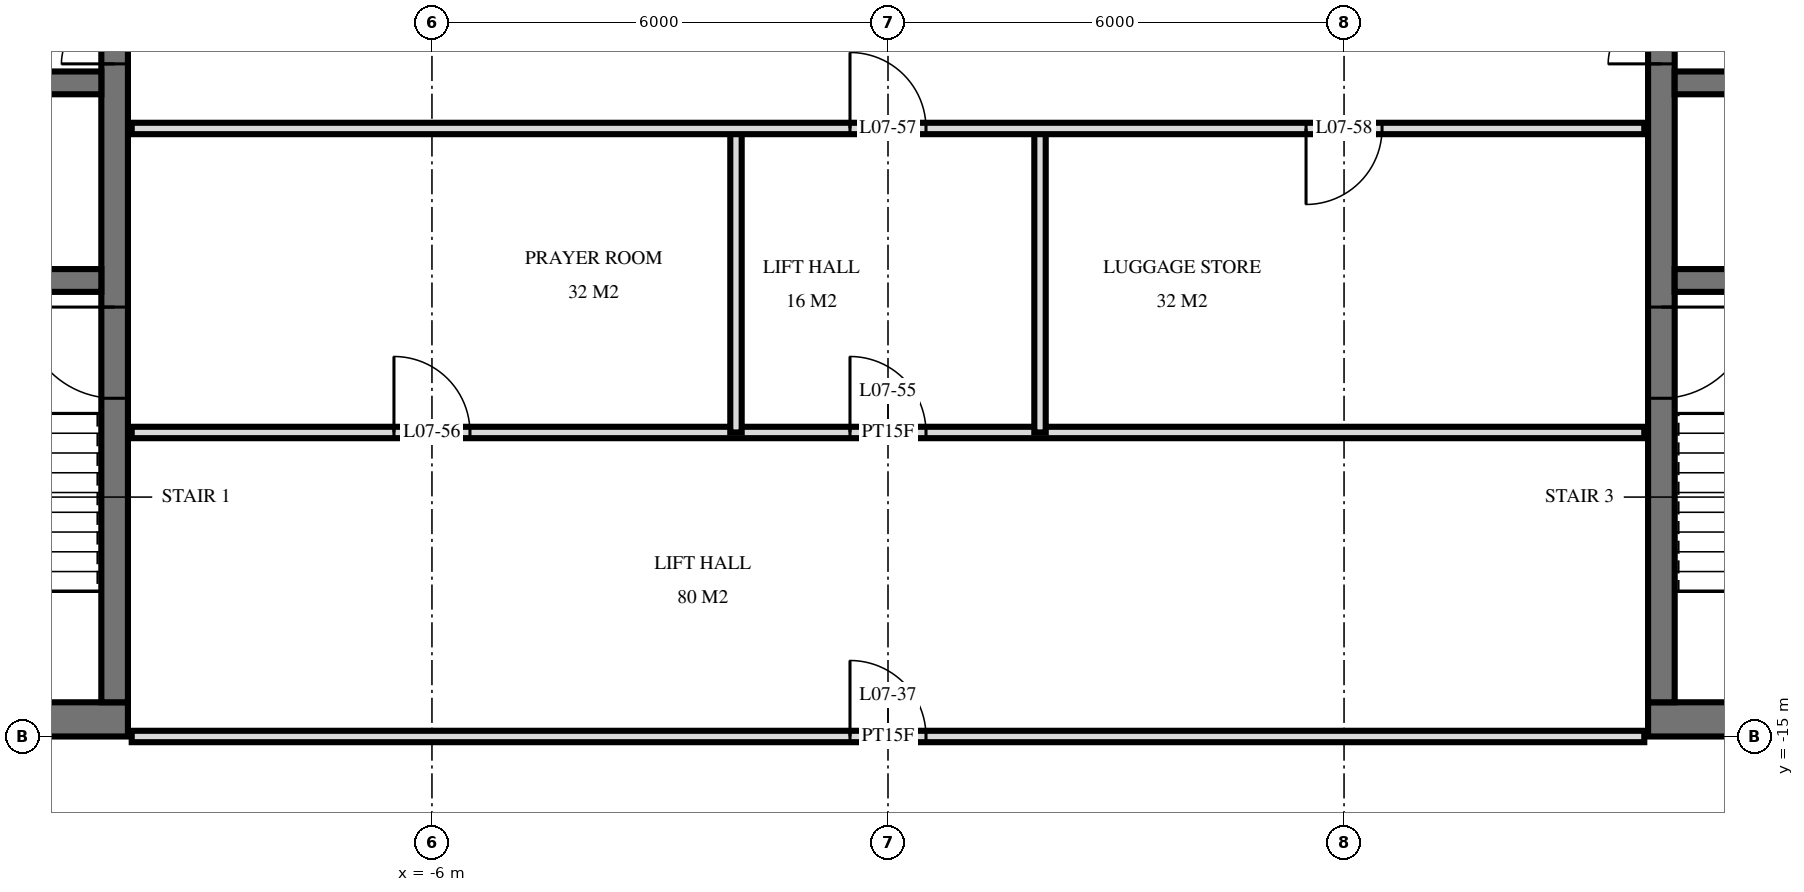
"""IFC4 building model, lengths in metres.
Left out: names, types, materials, properties, quantities, classifications, styles, units other than length and angle.
Written with IfcOpenShell. Run it as: python <this file> out.ifc"""

import sys

from ifc_helpers import new_model, si_unit, direction, frame, frame_2d, origin, place, context, subcontext, project, spatial, rectangle, extrude, element, fill, save


model = new_model("IFC4")
c1 = context("Model", 3, precision=1e-05, world=origin(), true_north=direction((0.0, 1.0)))
c2 = subcontext(c1, "Body", "Model", "MODEL_VIEW")
j1 = project(units=[si_unit("LENGTHUNIT", "METRE"), si_unit("PLANEANGLEUNIT", "RADIAN")], contexts=[c1])
p1 = place(None, origin())
s1 = spatial("IfcSite", under=j1, at=p1, CompositionType="ELEMENT")
p2 = place(p1, origin())
s2 = spatial("IfcBuilding", under=s1, at=p2, CompositionType="ELEMENT")
p3 = place(p2, frame((0.0, 0.0, 34.8)))
s3 = spatial("IfcBuildingStorey", under=s2, at=p3, CompositionType="ELEMENT", Elevation=34.8)
p4 = place(p3, frame((-29.5, -14.775, 0.0), z_axis=(0.0, 0.0, 1.0), x_axis=(1.0, 0.0, 0.0)))
e1 = element("IfcWall", 1, at=p4, inside=s3, PredefinedType="SHEAR", context=c2, shape_type="SweptSolid", body=[
    extrude(rectangle(XDim=19.5, YDim=0.45, at=frame_2d((9.75, 0.0))), origin(), (0.0, 0.0, 1.0), 3.6),
])
p5 = place(p4, frame((11.2, 0.0, 0.0)))
e2 = element("IfcOpeningElement", 2, at=p5, cuts=e1, PredefinedType="OPENING", context=c2, shape_type="SweptSolid", body=[
    extrude(rectangle(XDim=1.2, YDim=2.1, at=frame_2d((0.6, 1.05))), frame((0.0, 0.235, 0.0), z_axis=(0.0, -1.0, 0.0), x_axis=(1.0, 0.0, 0.0)), (0.0, 0.0, 1.0), 0.47),
])
p6 = place(p4, frame((14.25, 0.0, 0.0)))
e3 = element("IfcOpeningElement", 3, at=p6, cuts=e1, PredefinedType="OPENING", context=c2, shape_type="SweptSolid", body=[
    extrude(rectangle(XDim=1.1, YDim=2.1, at=frame_2d((0.55, 1.05))), frame((0.0, 0.235, 0.0), z_axis=(0.0, -1.0, 0.0), x_axis=(1.0, 0.0, 0.0)), (0.0, 0.0, 1.0), 0.47),
])
p7 = place(p4, frame((8.5, 0.0, 0.0)))
e4 = element("IfcOpeningElement", 4, at=p7, cuts=e1, PredefinedType="OPENING", context=c2, shape_type="SweptSolid", body=[
    extrude(rectangle(XDim=0.9, YDim=2.1, at=frame_2d((0.45, 1.05))), frame((0.0, 0.235, 0.0), z_axis=(0.0, -1.0, 0.0), x_axis=(1.0, 0.0, 0.0)), (0.0, 0.0, 1.0), 0.47),
])
p8 = place(p4, frame((6.05, 0.0, 0.0)))
e5 = element("IfcOpeningElement", 5, at=p8, cuts=e1, PredefinedType="OPENING", context=c2, shape_type="SweptSolid", body=[
    extrude(rectangle(XDim=1.0, YDim=2.1, at=frame_2d((0.5, 1.05))), frame((0.0, 0.235, 0.0), z_axis=(0.0, -1.0, 0.0), x_axis=(1.0, 0.0, 0.0)), (0.0, 0.0, 1.0), 0.47),
])
p9 = place(p4, frame((2.988, 0.0, 0.0)))
e6 = element("IfcOpeningElement", 6, at=p9, cuts=e1, PredefinedType="OPENING", context=c2, shape_type="SweptSolid", body=[
    extrude(rectangle(XDim=1.0, YDim=2.1, at=frame_2d((0.5, 1.05))), frame((0.0, 0.235, 0.0), z_axis=(0.0, -1.0, 0.0), x_axis=(1.0, 0.0, 0.0)), (0.0, 0.0, 1.0), 0.47),
])
p10 = place(p4, frame((0.663, 0.0, 0.0)))
e7 = element("IfcOpeningElement", 7, at=p10, cuts=e1, PredefinedType="OPENING", context=c2, shape_type="SweptSolid", body=[
    extrude(rectangle(XDim=1.0, YDim=2.1, at=frame_2d((0.5, 1.05))), frame((0.0, 0.235, 0.0), z_axis=(0.0, -1.0, 0.0), x_axis=(1.0, 0.0, 0.0)), (0.0, 0.0, 1.0), 0.47),
])
p11 = place(p3, frame((-10.175, -14.55, 0.0), z_axis=(0.0, 0.0, 1.0), x_axis=(0.0, 1.0, 0.0)))
e8 = element("IfcWall", 8, at=p11, inside=s3, PredefinedType="SHEAR", context=c2, shape_type="SweptSolid", body=[
    extrude(rectangle(XDim=14.1, YDim=0.35, at=frame_2d((7.05, 0.0))), origin(), (0.0, 0.0, 1.0), 3.6),
])
p12 = place(p11, frame((8.4, 0.0, 0.0)))
e9 = element("IfcOpeningElement", 9, at=p12, cuts=e8, PredefinedType="OPENING", context=c2, shape_type="SweptSolid", body=[
    extrude(rectangle(XDim=1.4, YDim=2.4, at=frame_2d((0.7, 1.2))), frame((0.0, 0.185, 0.0), z_axis=(0.0, -1.0, 0.0), x_axis=(1.0, 0.0, 0.0)), (0.0, 0.0, 1.0), 0.37),
])
p13 = place(p11, frame((10.0, 0.0, 0.0)))
e10 = element("IfcOpeningElement", 10, at=p13, cuts=e8, PredefinedType="OPENING", context=c2, shape_type="SweptSolid", body=[
    extrude(rectangle(XDim=1.4, YDim=2.4, at=frame_2d((0.7, 1.2))), frame((0.0, 0.185, 0.0), z_axis=(0.0, -1.0, 0.0), x_axis=(1.0, 0.0, 0.0)), (0.0, 0.0, 1.0), 0.37),
])
p14 = place(p11, frame((4.0, 0.0, 0.0)))
e11 = element("IfcOpeningElement", 11, at=p14, cuts=e8, PredefinedType="OPENING", context=c2, shape_type="SweptSolid", body=[
    extrude(rectangle(XDim=1.2, YDim=2.1, at=frame_2d((0.6, 1.05))), frame((0.0, 0.185, 0.0), z_axis=(0.0, -1.0, 0.0), x_axis=(1.0, 0.0, 0.0)), (0.0, 0.0, 1.0), 0.37),
])
p15 = place(p3, frame((-29.05, -6.4, 0.0), z_axis=(0.0, 0.0, 1.0), x_axis=(1.0, 0.0, 0.0)))
e12 = element("IfcWall", 12, at=p15, inside=s3, PredefinedType="SHEAR", context=c2, shape_type="SweptSolid", body=[
    extrude(rectangle(XDim=18.7, YDim=0.3, at=frame_2d((9.35, 0.0))), origin(), (0.0, 0.0, 1.0), 3.6),
])
p16 = place(p15, frame((2.95, 0.0, 0.0)))
e13 = element("IfcOpeningElement", 13, at=p16, cuts=e12, PredefinedType="OPENING", context=c2, shape_type="SweptSolid", body=[
    extrude(rectangle(XDim=1.1, YDim=2.1, at=frame_2d((0.55, 1.05))), frame((0.0, 0.16, 0.0), z_axis=(0.0, -1.0, 0.0), x_axis=(1.0, 0.0, 0.0)), (0.0, 0.0, 1.0), 0.32),
])
p17 = place(p15, frame((0.55, 0.0, 0.0)))
e14 = element("IfcOpeningElement", 14, at=p17, cuts=e12, PredefinedType="OPENING", context=c2, shape_type="SweptSolid", body=[
    extrude(rectangle(XDim=1.1, YDim=2.1, at=frame_2d((0.55, 1.05))), frame((0.0, 0.16, 0.0), z_axis=(0.0, -1.0, 0.0), x_axis=(1.0, 0.0, 0.0)), (0.0, 0.0, 1.0), 0.32),
])
p18 = place(p15, frame((10.8, 0.0, 0.0)))
e15 = element("IfcOpeningElement", 15, at=p18, cuts=e12, PredefinedType="OPENING", context=c2, shape_type="SweptSolid", body=[
    extrude(rectangle(XDim=1.1, YDim=2.1, at=frame_2d((0.55, 1.05))), frame((0.0, 0.16, 0.0), z_axis=(0.0, -1.0, 0.0), x_axis=(1.0, 0.0, 0.0)), (0.0, 0.0, 1.0), 0.32),
])
p19 = place(p15, frame((5.6, 0.0, 0.0)))
e16 = element("IfcOpeningElement", 16, at=p19, cuts=e12, PredefinedType="OPENING", context=c2, shape_type="SweptSolid", body=[
    extrude(rectangle(XDim=1.0, YDim=2.1, at=frame_2d((0.5, 1.05))), frame((0.0, 0.16, 0.0), z_axis=(0.0, -1.0, 0.0), x_axis=(1.0, 0.0, 0.0)), (0.0, 0.0, 1.0), 0.32),
])
p20 = place(p3, frame((-29.05, -9.0, 0.0), z_axis=(0.0, 0.0, 1.0), x_axis=(1.0, 0.0, 0.0)))
e17 = element("IfcWall", 17, at=p20, inside=s3, PredefinedType="SHEAR", context=c2, shape_type="SweptSolid", body=[
    extrude(rectangle(XDim=18.7, YDim=0.3, at=frame_2d((9.35, 0.0))), origin(), (0.0, 0.0, 1.0), 3.6),
])
p21 = place(p20, frame((13.8, 0.0, 0.0)))
e18 = element("IfcOpeningElement", 18, at=p21, cuts=e17, PredefinedType="OPENING", context=c2, shape_type="SweptSolid", body=[
    extrude(rectangle(XDim=1.1, YDim=2.1, at=frame_2d((0.55, 1.05))), frame((0.0, 0.16, 0.0), z_axis=(0.0, -1.0, 0.0), x_axis=(1.0, 0.0, 0.0)), (0.0, 0.0, 1.0), 0.32),
])
p22 = place(p3, frame((10.0, -14.775, 0.0), z_axis=(0.0, 0.0, 1.0), x_axis=(1.0, 0.0, 0.0)))
e19 = element("IfcWall", 19, at=p22, inside=s3, PredefinedType="SHEAR", context=c2, shape_type="SweptSolid", body=[
    extrude(rectangle(XDim=19.5, YDim=0.45, at=frame_2d((9.75, 0.0))), origin(), (0.0, 0.0, 1.0), 3.6),
])
p23 = place(p22, frame((7.1, 0.0, 0.0)))
e20 = element("IfcOpeningElement", 20, at=p23, cuts=e19, PredefinedType="OPENING", context=c2, shape_type="SweptSolid", body=[
    extrude(rectangle(XDim=1.2, YDim=2.1, at=frame_2d((0.6, 1.05))), frame((0.0, 0.235, 0.0), z_axis=(0.0, -1.0, 0.0), x_axis=(1.0, 0.0, 0.0)), (0.0, 0.0, 1.0), 0.47),
])
p24 = place(p22, frame((4.15, 0.0, 0.0)))
e21 = element("IfcOpeningElement", 21, at=p24, cuts=e19, PredefinedType="OPENING", context=c2, shape_type="SweptSolid", body=[
    extrude(rectangle(XDim=1.1, YDim=2.1, at=frame_2d((0.55, 1.05))), frame((0.0, 0.235, 0.0), z_axis=(0.0, -1.0, 0.0), x_axis=(1.0, 0.0, 0.0)), (0.0, 0.0, 1.0), 0.47),
])
p25 = place(p22, frame((10.1, 0.0, 0.0)))
e22 = element("IfcOpeningElement", 22, at=p25, cuts=e19, PredefinedType="OPENING", context=c2, shape_type="SweptSolid", body=[
    extrude(rectangle(XDim=0.9, YDim=2.1, at=frame_2d((0.45, 1.05))), frame((0.0, 0.235, 0.0), z_axis=(0.0, -1.0, 0.0), x_axis=(1.0, 0.0, 0.0)), (0.0, 0.0, 1.0), 0.47),
])
p26 = place(p22, frame((12.45, 0.0, 0.0)))
e23 = element("IfcOpeningElement", 23, at=p26, cuts=e19, PredefinedType="OPENING", context=c2, shape_type="SweptSolid", body=[
    extrude(rectangle(XDim=1.0, YDim=2.1, at=frame_2d((0.5, 1.05))), frame((0.0, 0.235, 0.0), z_axis=(0.0, -1.0, 0.0), x_axis=(1.0, 0.0, 0.0)), (0.0, 0.0, 1.0), 0.47),
])
p27 = place(p22, frame((15.512, 0.0, 0.0)))
e24 = element("IfcOpeningElement", 24, at=p27, cuts=e19, PredefinedType="OPENING", context=c2, shape_type="SweptSolid", body=[
    extrude(rectangle(XDim=1.0, YDim=2.1, at=frame_2d((0.5, 1.05))), frame((0.0, 0.235, 0.0), z_axis=(0.0, -1.0, 0.0), x_axis=(1.0, 0.0, 0.0)), (0.0, 0.0, 1.0), 0.47),
])
p28 = place(p22, frame((17.837, 0.0, 0.0)))
e25 = element("IfcOpeningElement", 25, at=p28, cuts=e19, PredefinedType="OPENING", context=c2, shape_type="SweptSolid", body=[
    extrude(rectangle(XDim=1.0, YDim=2.1, at=frame_2d((0.5, 1.05))), frame((0.0, 0.235, 0.0), z_axis=(0.0, -1.0, 0.0), x_axis=(1.0, 0.0, 0.0)), (0.0, 0.0, 1.0), 0.47),
])
p29 = place(p3, frame((10.175, -14.55, 0.0), z_axis=(0.0, 0.0, 1.0), x_axis=(0.0, 1.0, 0.0)))
e26 = element("IfcWall", 26, at=p29, inside=s3, PredefinedType="SHEAR", context=c2, shape_type="SweptSolid", body=[
    extrude(rectangle(XDim=14.1, YDim=0.35, at=frame_2d((7.05, 0.0))), origin(), (0.0, 0.0, 1.0), 3.6),
])
p30 = place(p29, frame((8.4, 0.0, 0.0)))
e27 = element("IfcOpeningElement", 27, at=p30, cuts=e26, PredefinedType="OPENING", context=c2, shape_type="SweptSolid", body=[
    extrude(rectangle(XDim=1.4, YDim=2.4, at=frame_2d((0.7, 1.2))), frame((0.0, 0.185, 0.0), z_axis=(0.0, -1.0, 0.0), x_axis=(1.0, 0.0, 0.0)), (0.0, 0.0, 1.0), 0.37),
])
p31 = place(p29, frame((10.0, 0.0, 0.0)))
e28 = element("IfcOpeningElement", 28, at=p31, cuts=e26, PredefinedType="OPENING", context=c2, shape_type="SweptSolid", body=[
    extrude(rectangle(XDim=1.4, YDim=2.4, at=frame_2d((0.7, 1.2))), frame((0.0, 0.185, 0.0), z_axis=(0.0, -1.0, 0.0), x_axis=(1.0, 0.0, 0.0)), (0.0, 0.0, 1.0), 0.37),
])
p32 = place(p29, frame((4.0, 0.0, 0.0)))
e29 = element("IfcOpeningElement", 29, at=p32, cuts=e26, PredefinedType="OPENING", context=c2, shape_type="SweptSolid", body=[
    extrude(rectangle(XDim=1.2, YDim=2.1, at=frame_2d((0.6, 1.05))), frame((0.0, 0.185, 0.0), z_axis=(0.0, -1.0, 0.0), x_axis=(1.0, 0.0, 0.0)), (0.0, 0.0, 1.0), 0.37),
])
p33 = place(p3, frame((10.35, -6.4, 0.0), z_axis=(0.0, 0.0, 1.0), x_axis=(1.0, 0.0, 0.0)))
e30 = element("IfcWall", 30, at=p33, inside=s3, PredefinedType="SHEAR", context=c2, shape_type="SweptSolid", body=[
    extrude(rectangle(XDim=18.7, YDim=0.3, at=frame_2d((9.35, 0.0))), origin(), (0.0, 0.0, 1.0), 3.6),
])
p34 = place(p33, frame((14.65, 0.0, 0.0)))
e31 = element("IfcOpeningElement", 31, at=p34, cuts=e30, PredefinedType="OPENING", context=c2, shape_type="SweptSolid", body=[
    extrude(rectangle(XDim=1.1, YDim=2.1, at=frame_2d((0.55, 1.05))), frame((0.0, 0.16, 0.0), z_axis=(0.0, -1.0, 0.0), x_axis=(1.0, 0.0, 0.0)), (0.0, 0.0, 1.0), 0.32),
])
p35 = place(p33, frame((17.05, 0.0, 0.0)))
e32 = element("IfcOpeningElement", 32, at=p35, cuts=e30, PredefinedType="OPENING", context=c2, shape_type="SweptSolid", body=[
    extrude(rectangle(XDim=1.1, YDim=2.1, at=frame_2d((0.55, 1.05))), frame((0.0, 0.16, 0.0), z_axis=(0.0, -1.0, 0.0), x_axis=(1.0, 0.0, 0.0)), (0.0, 0.0, 1.0), 0.32),
])
p36 = place(p33, frame((6.8, 0.0, 0.0)))
e33 = element("IfcOpeningElement", 33, at=p36, cuts=e30, PredefinedType="OPENING", context=c2, shape_type="SweptSolid", body=[
    extrude(rectangle(XDim=1.1, YDim=2.1, at=frame_2d((0.55, 1.05))), frame((0.0, 0.16, 0.0), z_axis=(0.0, -1.0, 0.0), x_axis=(1.0, 0.0, 0.0)), (0.0, 0.0, 1.0), 0.32),
])
p37 = place(p33, frame((12.1, 0.0, 0.0)))
e34 = element("IfcOpeningElement", 34, at=p37, cuts=e30, PredefinedType="OPENING", context=c2, shape_type="SweptSolid", body=[
    extrude(rectangle(XDim=1.0, YDim=2.1, at=frame_2d((0.5, 1.05))), frame((0.0, 0.16, 0.0), z_axis=(0.0, -1.0, 0.0), x_axis=(1.0, 0.0, 0.0)), (0.0, 0.0, 1.0), 0.32),
])
p38 = place(p3, frame((10.35, -9.0, 0.0), z_axis=(0.0, 0.0, 1.0), x_axis=(1.0, 0.0, 0.0)))
e35 = element("IfcWall", 35, at=p38, inside=s3, PredefinedType="SHEAR", context=c2, shape_type="SweptSolid", body=[
    extrude(rectangle(XDim=18.7, YDim=0.3, at=frame_2d((9.35, 0.0))), origin(), (0.0, 0.0, 1.0), 3.6),
])
p39 = place(p38, frame((3.8, 0.0, 0.0)))
e36 = element("IfcOpeningElement", 36, at=p39, cuts=e35, PredefinedType="OPENING", context=c2, shape_type="SweptSolid", body=[
    extrude(rectangle(XDim=1.1, YDim=2.1, at=frame_2d((0.55, 1.05))), frame((0.0, 0.16, 0.0), z_axis=(0.0, -1.0, 0.0), x_axis=(1.0, 0.0, 0.0)), (0.0, 0.0, 1.0), 0.32),
])
for number, where, z_axis, x_axis in (
    (37, (2.0, -11.0, 0.0), (0.0, 0.0, 1.0), (0.0, 1.0, 0.0)),
    (38, (-2.0, -11.0, 0.0), (0.0, 0.0, 1.0), (0.0, 1.0, 0.0)),
):
    element("IfcWall", number, at=place(p3, frame(where, z_axis=z_axis, x_axis=x_axis)), inside=s3, PredefinedType="PARTITIONING", context=c2, shape_type="SweptSolid", body=[
        extrude(rectangle(XDim=4.0, YDim=0.15, at=frame_2d((2.0, 0.0))), origin(), (0.0, 0.0, 1.0), 3.32),
    ])
p40 = place(p3, frame((-9.95, -15.0, 0.0), z_axis=(0.0, 0.0, 1.0), x_axis=(1.0, 0.0, 0.0)))
e39 = element("IfcWall", 39, at=p40, inside=s3, PredefinedType="PARTITIONING", context=c2, shape_type="SweptSolid", body=[
    extrude(rectangle(XDim=19.9, YDim=0.15, at=frame_2d((9.95, 0.0))), origin(), (0.0, 0.0, 1.0), 2.684),
])
p41 = place(p40, frame((9.45, 0.0, 0.0)))
e40 = element("IfcOpeningElement", 40, at=p41, cuts=e39, PredefinedType="OPENING", context=c2, shape_type="SweptSolid", body=[
    extrude(rectangle(XDim=1.0, YDim=2.1, at=frame_2d((0.5, 1.05))), frame((0.0, 0.085, 0.0), z_axis=(0.0, -1.0, 0.0), x_axis=(1.0, 0.0, 0.0)), (0.0, 0.0, 1.0), 0.17),
])
p42 = place(p3, frame((-9.95, -11.0, 0.0), z_axis=(0.0, 0.0, 1.0), x_axis=(1.0, 0.0, 0.0)))
e41 = element("IfcWall", 41, at=p42, inside=s3, PredefinedType="PARTITIONING", context=c2, shape_type="SweptSolid", body=[
    extrude(rectangle(XDim=19.9, YDim=0.15, at=frame_2d((9.95, 0.0))), origin(), (0.0, 0.0, 1.0), 3.32),
])
p43 = place(p42, frame((9.45, 0.0, 0.0)))
e42 = element("IfcOpeningElement", 42, at=p43, cuts=e41, PredefinedType="OPENING", context=c2, shape_type="SweptSolid", body=[
    extrude(rectangle(XDim=1.0, YDim=2.1, at=frame_2d((0.5, 1.05))), frame((0.0, 0.085, 0.0), z_axis=(0.0, -1.0, 0.0), x_axis=(1.0, 0.0, 0.0)), (0.0, 0.0, 1.0), 0.17),
])
p44 = place(p42, frame((3.45, 0.0, 0.0)))
e43 = element("IfcOpeningElement", 43, at=p44, cuts=e41, PredefinedType="OPENING", context=c2, shape_type="SweptSolid", body=[
    extrude(rectangle(XDim=1.0, YDim=2.1, at=frame_2d((0.5, 1.05))), frame((0.0, 0.085, 0.0), z_axis=(0.0, -1.0, 0.0), x_axis=(1.0, 0.0, 0.0)), (0.0, 0.0, 1.0), 0.17),
])
p45 = place(p3, frame((-9.95, -7.0, 0.0), z_axis=(0.0, 0.0, 1.0), x_axis=(1.0, 0.0, 0.0)))
e44 = element("IfcWall", 44, at=p45, inside=s3, PredefinedType="PARTITIONING", context=c2, shape_type="SweptSolid", body=[
    extrude(rectangle(XDim=19.9, YDim=0.15, at=frame_2d((9.95, 0.0))), origin(), (0.0, 0.0, 1.0), 3.32),
])
p46 = place(p45, frame((9.45, 0.0, 0.0)))
e45 = element("IfcOpeningElement", 45, at=p46, cuts=e44, PredefinedType="OPENING", context=c2, shape_type="SweptSolid", body=[
    extrude(rectangle(XDim=1.0, YDim=2.1, at=frame_2d((0.5, 1.05))), frame((0.0, 0.085, 0.0), z_axis=(0.0, -1.0, 0.0), x_axis=(1.0, 0.0, 0.0)), (0.0, 0.0, 1.0), 0.17),
])
p47 = place(p45, frame((15.45, 0.0, 0.0)))
e46 = element("IfcOpeningElement", 46, at=p47, cuts=e44, PredefinedType="OPENING", context=c2, shape_type="SweptSolid", body=[
    extrude(rectangle(XDim=1.0, YDim=2.1, at=frame_2d((0.5, 1.05))), frame((0.0, 0.085, 0.0), z_axis=(0.0, -1.0, 0.0), x_axis=(1.0, 0.0, 0.0)), (0.0, 0.0, 1.0), 0.17),
])
p48 = place(p12, origin())
e47 = element("IfcDoor", 47, at=p48, inside=s3, OperationType="DOUBLE_DOOR_SINGLE_SWING", PredefinedType="DOOR", context=c2, shape_type="SweptSolid", body=[
    extrude(rectangle(XDim=1.4, YDim=2.4, at=frame_2d((0.7, 1.2))), frame((0.0, 0.025, 0.0), z_axis=(0.0, -1.0, 0.0), x_axis=(1.0, 0.0, 0.0)), (0.0, 0.0, 1.0), 0.05),
])
fill(e9, e47)
p49 = place(p14, origin())
e48 = element("IfcDoor", 48, at=p49, inside=s3, OperationType="SINGLE_SWING_LEFT", PredefinedType="DOOR", context=c2, shape_type="SweptSolid", body=[
    extrude(rectangle(XDim=1.2, YDim=2.1, at=frame_2d((0.6, 1.05))), frame((0.0, 0.025, 0.0), z_axis=(0.0, -1.0, 0.0), x_axis=(1.0, 0.0, 0.0)), (0.0, 0.0, 1.0), 0.05),
])
fill(e11, e48)
p50 = place(p30, origin())
e49 = element("IfcDoor", 49, at=p50, inside=s3, OperationType="DOUBLE_DOOR_SINGLE_SWING", PredefinedType="DOOR", context=c2, shape_type="SweptSolid", body=[
    extrude(rectangle(XDim=1.4, YDim=2.4, at=frame_2d((0.7, 1.2))), frame((0.0, 0.025, 0.0), z_axis=(0.0, -1.0, 0.0), x_axis=(1.0, 0.0, 0.0)), (0.0, 0.0, 1.0), 0.05),
])
fill(e27, e49)
p51 = place(p32, frame((0.6, 0.0, 0.0), z_axis=(0.0, 0.0, 1.0), x_axis=(-1.0, 0.0, 0.0)))
e50 = element("IfcDoor", 50, at=p51, inside=s3, OperationType="SINGLE_SWING_RIGHT", PredefinedType="DOOR", context=c2, shape_type="SweptSolid", body=[
    extrude(rectangle(XDim=1.2, YDim=2.1, at=frame_2d((0.0, 1.05))), frame((0.0, -0.025, 0.0), z_axis=(0.0, 1.0, 0.0), x_axis=(-1.0, 0.0, 0.0)), (0.0, 0.0, 1.0), 0.05),
])
fill(e29, e50)
p52 = place(p41, origin())
e51 = element("IfcDoor", 51, at=p52, inside=s3, OperationType="SINGLE_SWING_RIGHT", PredefinedType="DOOR", context=c2, shape_type="SweptSolid", body=[
    extrude(rectangle(XDim=1.0, YDim=2.1, at=frame_2d((0.5, 1.05))), frame((0.0, 0.025, 0.0), z_axis=(0.0, -1.0, 0.0), x_axis=(1.0, 0.0, 0.0)), (0.0, 0.0, 1.0), 0.05),
])
fill(e40, e51)
p53 = place(p43, origin())
e52 = element("IfcDoor", 52, at=p53, inside=s3, OperationType="SINGLE_SWING_RIGHT", PredefinedType="DOOR", context=c2, shape_type="SweptSolid", body=[
    extrude(rectangle(XDim=1.0, YDim=2.1, at=frame_2d((0.5, 1.05))), frame((0.0, 0.025, 0.0), z_axis=(0.0, -1.0, 0.0), x_axis=(1.0, 0.0, 0.0)), (0.0, 0.0, 1.0), 0.05),
])
fill(e42, e52)
p54 = place(p44, origin())
e53 = element("IfcDoor", 53, at=p54, inside=s3, OperationType="SINGLE_SWING_RIGHT", PredefinedType="DOOR", context=c2, shape_type="SweptSolid", body=[
    extrude(rectangle(XDim=1.0, YDim=2.1, at=frame_2d((0.5, 1.05))), frame((0.0, 0.025, 0.0), z_axis=(0.0, -1.0, 0.0), x_axis=(1.0, 0.0, 0.0)), (0.0, 0.0, 1.0), 0.05),
])
fill(e43, e53)
p55 = place(p46, origin())
e54 = element("IfcDoor", 54, at=p55, inside=s3, OperationType="SINGLE_SWING_RIGHT", PredefinedType="DOOR", context=c2, shape_type="SweptSolid", body=[
    extrude(rectangle(XDim=1.0, YDim=2.1, at=frame_2d((0.5, 1.05))), frame((0.0, 0.025, 0.0), z_axis=(0.0, -1.0, 0.0), x_axis=(1.0, 0.0, 0.0)), (0.0, 0.0, 1.0), 0.05),
])
fill(e45, e54)
p56 = place(p47, frame((0.5, 0.0, 0.0), z_axis=(0.0, 0.0, 1.0), x_axis=(-1.0, 0.0, 0.0)))
e55 = element("IfcDoor", 55, at=p56, inside=s3, OperationType="SINGLE_SWING_LEFT", PredefinedType="DOOR", context=c2, shape_type="SweptSolid", body=[
    extrude(rectangle(XDim=1.0, YDim=2.1, at=frame_2d((0.0, 1.05))), frame((0.0, -0.025, 0.0), z_axis=(0.0, 1.0, 0.0), x_axis=(-1.0, 0.0, 0.0)), (0.0, 0.0, 1.0), 0.05),
])
fill(e46, e55)
save(model, sys.argv[1])
